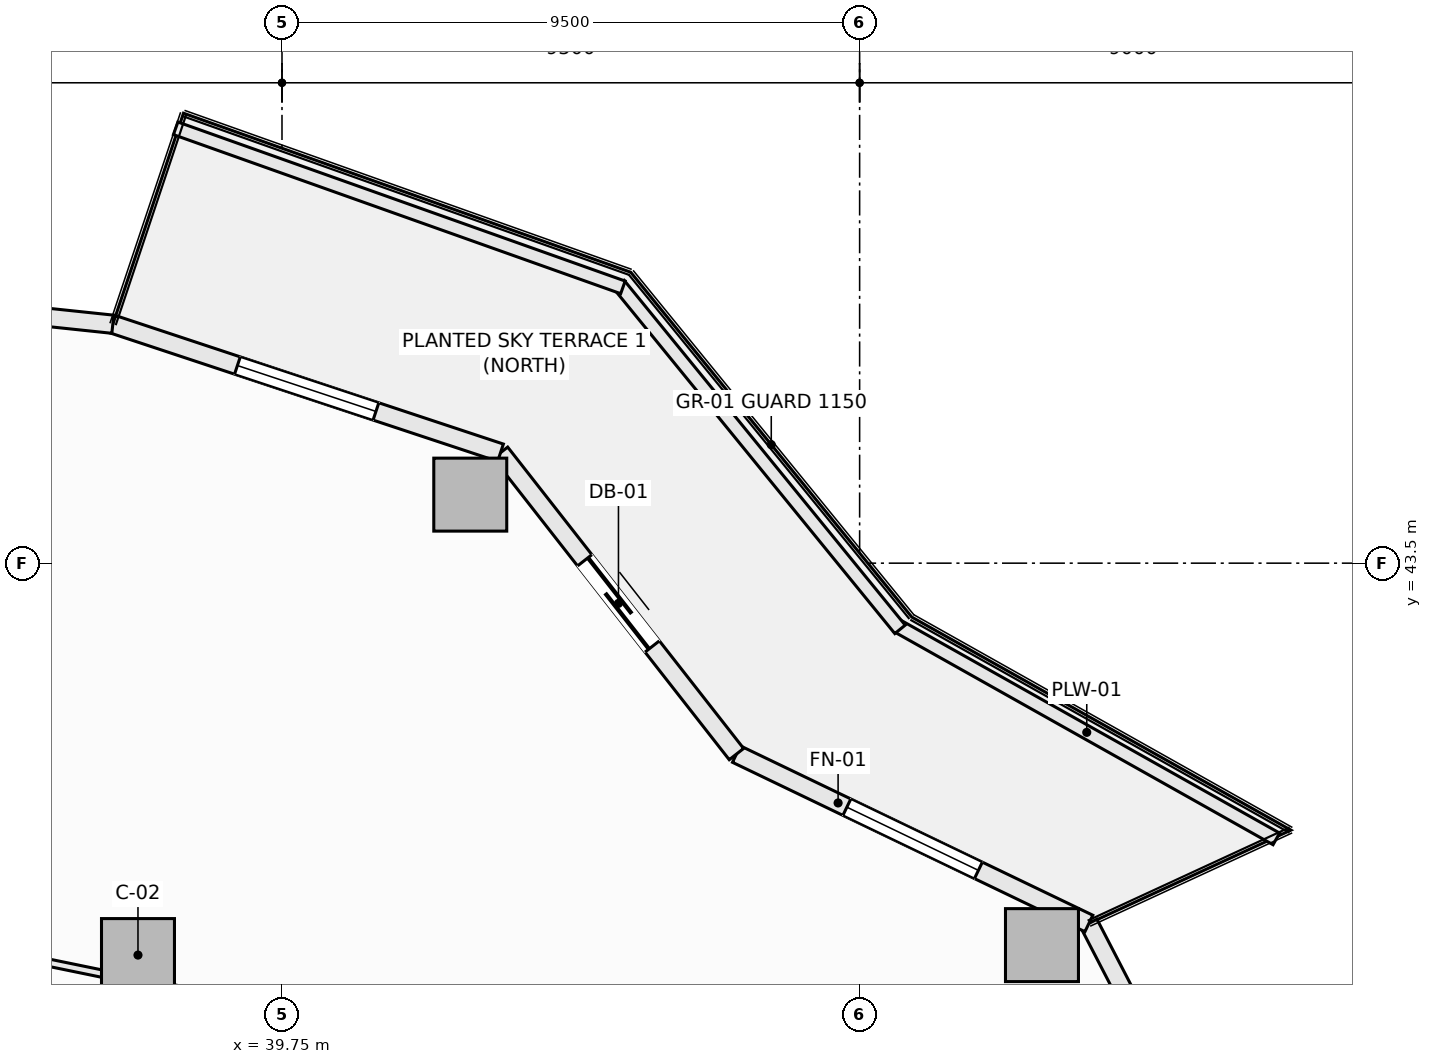
"""IFC4 building model, lengths in metres.
Left out: names, types, materials, properties, quantities, classifications, styles, units other than length and angle.
Written with IfcOpenShell. Run it as: python <this file> out.ifc"""

import sys

from ifc_helpers import new_model, si_unit, direction, frame, frame_2d, origin, origin_2d, place, context, subcontext, project, spatial, rectangle, extrude, element, fill, save


model = new_model("IFC4")
c1 = context("Model", 3, precision=1e-05, world=origin(), true_north=direction((0.0, 1.0)))
c2 = subcontext(c1, "Body", "Model", "MODEL_VIEW")
j1 = project(units=[si_unit("LENGTHUNIT", "METRE"), si_unit("PLANEANGLEUNIT", "RADIAN")], contexts=[c1])
p1 = place(None, origin())
s1 = spatial("IfcSite", under=j1, at=p1, CompositionType="ELEMENT")
p2 = place(p1, origin())
s2 = spatial("IfcBuilding", under=s1, at=p2, CompositionType="ELEMENT")
p3 = place(p2, frame((0.0, 0.0, 57.3)))
s3 = spatial("IfcBuildingStorey", under=s2, at=p3, CompositionType="ELEMENT", Elevation=57.3)
for number, where, z_axis, x_axis in (
    (1, (52.249, 37.219, -0.28), (0.0, 0.0, 1.0), (1.0, 0.0, 0.0)),
    (2, (42.846, 44.627, -0.28), (0.0, 0.0, 1.0), (1.0, 0.0, 0.0)),
    (3, (37.382, 37.055, -0.28), (0.0, 0.0, 1.0), (1.0, 0.0, 0.0)),
):
    element("IfcColumn", number, at=place(p3, frame(where, z_axis=z_axis, x_axis=x_axis)), inside=s3, PredefinedType="COLUMN", context=c2, shape_type="SweptSolid", body=[
        extrude(rectangle(XDim=1.2, YDim=1.2, at=origin_2d()), origin(), (0.0, 0.0, 1.0), 3.85),
    ])
p4 = place(p3, frame((53.021, 37.575, 0.0), z_axis=(0.0, 0.0, 1.0), x_axis=(0.459800981414, -0.888021991558, 0.0)))
e4 = element("IfcWall", 4, at=p4, inside=s3, PredefinedType="SOLIDWALL", context=c2, shape_type="SweptSolid", body=[
    extrude(rectangle(XDim=5.744, YDim=0.3, at=frame_2d((2.872, 0.0))), origin(), (0.0, 0.0, 1.0), 3.093),
])
p5 = place(p4, frame((1.672, 0.0, 0.85)))
e5 = element("IfcOpeningElement", 5, at=p5, cuts=e4, PredefinedType="OPENING", context=c2, shape_type="SweptSolid", body=[
    extrude(rectangle(XDim=2.4, YDim=1.9, at=frame_2d((1.2, 0.95))), frame((0.0, 0.16, 0.0), z_axis=(0.0, -1.0, 0.0), x_axis=(1.0, 0.0, 0.0)), (0.0, 0.0, 1.0), 0.32),
])
p6 = place(p3, frame((47.224, 40.36, 0.0), z_axis=(0.0, 0.0, 1.0), x_axis=(0.901354747727, -0.433081538224, 0.0)))
e6 = element("IfcWall", 6, at=p6, inside=s3, PredefinedType="SOLIDWALL", context=c2, shape_type="SweptSolid", body=[
    extrude(rectangle(XDim=6.431, YDim=0.3, at=frame_2d((3.215, 0.0))), origin(), (0.0, 0.0, 1.0), 3.093),
])
p7 = place(p6, frame((2.015, 0.0, 0.85)))
e7 = element("IfcOpeningElement", 7, at=p7, cuts=e6, PredefinedType="OPENING", context=c2, shape_type="SweptSolid", body=[
    extrude(rectangle(XDim=2.4, YDim=1.9, at=frame_2d((1.2, 0.95))), frame((0.0, 0.16, 0.0), z_axis=(0.0, -1.0, 0.0), x_axis=(1.0, 0.0, 0.0)), (0.0, 0.0, 1.0), 0.32),
])
p8 = place(p3, frame((43.344, 45.316, 0.0), z_axis=(0.0, 0.0, 1.0), x_axis=(0.616434798832, -0.78740595552, 0.0)))
e8 = element("IfcWall", 8, at=p8, inside=s3, PredefinedType="SOLIDWALL", context=c2, shape_type="SweptSolid", body=[
    extrude(rectangle(XDim=6.294, YDim=0.3, at=frame_2d((3.147, 0.0))), origin(), (0.0, 0.0, 1.0), 3.093),
])
p9 = place(p8, frame((2.247, 0.0, 0.0)))
e9 = element("IfcOpeningElement", 9, at=p9, cuts=e8, PredefinedType="OPENING", context=c2, shape_type="SweptSolid", body=[
    extrude(rectangle(XDim=1.8, YDim=2.25, at=frame_2d((0.9, 1.125))), frame((0.0, 0.16, 0.0), z_axis=(0.0, -1.0, 0.0), x_axis=(1.0, 0.0, 0.0)), (0.0, 0.0, 1.0), 0.32),
])
p10 = place(p3, frame((36.968, 47.429, 0.0), z_axis=(0.0, 0.0, 1.0), x_axis=(0.949245153629, -0.314537181127, 0.0)))
e10 = element("IfcWall", 10, at=p10, inside=s3, PredefinedType="SOLIDWALL", context=c2, shape_type="SweptSolid", body=[
    extrude(rectangle(XDim=6.717, YDim=0.3, at=frame_2d((3.358, 0.0))), origin(), (0.0, 0.0, 1.0), 3.093),
])
p11 = place(p10, frame((2.159, 0.0, 0.85)))
e11 = element("IfcOpeningElement", 11, at=p11, cuts=e10, PredefinedType="OPENING", context=c2, shape_type="SweptSolid", body=[
    extrude(rectangle(XDim=2.4, YDim=1.9, at=frame_2d((1.2, 0.95))), frame((0.0, 0.16, 0.0), z_axis=(0.0, -1.0, 0.0), x_axis=(1.0, 0.0, 0.0)), (0.0, 0.0, 1.0), 0.32),
])
p12 = place(p3, frame((30.125, 48.15, 0.0), z_axis=(0.0, 0.0, 1.0), x_axis=(0.994498840295, -0.104747585419, 0.0)))
e12 = element("IfcWall", 12, at=p12, inside=s3, PredefinedType="SOLIDWALL", context=c2, shape_type="SweptSolid", body=[
    extrude(rectangle(XDim=6.88, YDim=0.3, at=frame_2d((3.44, 0.0))), origin(), (0.0, 0.0, 1.0), 3.093),
])
p13 = place(p12, frame((2.24, 0.0, 0.85)))
e13 = element("IfcOpeningElement", 13, at=p13, cuts=e12, PredefinedType="OPENING", context=c2, shape_type="SweptSolid", body=[
    extrude(rectangle(XDim=2.4, YDim=1.9, at=frame_2d((1.2, 0.95))), frame((0.0, 0.16, 0.0), z_axis=(0.0, -1.0, 0.0), x_axis=(1.0, 0.0, 0.0)), (0.0, 0.0, 1.0), 0.32),
])
p14 = place(p3, frame((49.868, 42.469, 0.0), z_axis=(0.0, 0.0, 1.0), x_axis=(0.871775109335, -0.489906275468, 0.0)))
e14 = element("IfcWall", 14, at=p14, inside=s3, PredefinedType="PARAPET", context=c2, shape_type="SweptSolid", body=[
    extrude(rectangle(XDim=7.152, YDim=0.22, at=frame_2d((3.576, 0.0))), origin(), (0.0, 0.0, 1.0), 0.52),
])
p15 = place(p3, frame((45.292, 48.082, 0.0), z_axis=(0.0, 0.0, 1.0), x_axis=(0.631819273026, -0.775115737315, 0.0)))
e15 = element("IfcWall", 15, at=p15, inside=s3, PredefinedType="PARAPET", context=c2, shape_type="SweptSolid", body=[
    extrude(rectangle(XDim=7.316, YDim=0.22, at=frame_2d((3.658, 0.0))), origin(), (0.0, 0.0, 1.0), 0.52),
])
p16 = place(p3, frame((38.001, 50.651, 0.0), z_axis=(0.0, 0.0, 1.0), x_axis=(0.942203722205, -0.335040513764, 0.0)))
e16 = element("IfcWall", 16, at=p16, inside=s3, PredefinedType="PARAPET", context=c2, shape_type="SweptSolid", body=[
    extrude(rectangle(XDim=7.807, YDim=0.22, at=frame_2d((3.904, 0.0))), origin(), (0.0, 0.0, 1.0), 0.52),
])
p17 = place(p3, frame((29.842, 38.177, 0.0), z_axis=(0.0, 0.0, 1.0), x_axis=(0.979543984113, -0.201230174647, 0.0)))
e17 = element("IfcWall", 17, at=p17, inside=s3, PredefinedType="PARTITIONING", context=c2, shape_type="SweptSolid", body=[
    extrude(rectangle(XDim=16.654, YDim=0.12, at=frame_2d((8.327, 0.0))), origin(), (0.0, 0.0, 1.0), 2.934),
])
p18 = place(p7, origin())
e18 = element("IfcWindow", 18, at=p18, inside=s3, PartitioningType="SINGLE_PANEL", PredefinedType="WINDOW", context=c2, shape_type="SweptSolid", body=[
    extrude(rectangle(XDim=2.4, YDim=1.9, at=frame_2d((1.2, 0.95))), frame((0.0, 0.03, 0.0), z_axis=(0.0, -1.0, 0.0), x_axis=(1.0, 0.0, 0.0)), (0.0, 0.0, 1.0), 0.06),
])
fill(e7, e18)
p19 = place(p9, origin())
e19 = element("IfcDoor", 19, at=p19, inside=s3, OperationType="SLIDING_TO_LEFT", PredefinedType="DOOR", context=c2, shape_type="SweptSolid", body=[
    extrude(rectangle(XDim=1.8, YDim=2.25, at=frame_2d((0.9, 1.125))), frame((0.0, 0.025, 0.0), z_axis=(0.0, -1.0, 0.0), x_axis=(1.0, 0.0, 0.0)), (0.0, 0.0, 1.0), 0.05),
])
fill(e9, e19)
p20 = place(p11, origin())
e20 = element("IfcWindow", 20, at=p20, inside=s3, PartitioningType="SINGLE_PANEL", PredefinedType="WINDOW", context=c2, shape_type="SweptSolid", body=[
    extrude(rectangle(XDim=2.4, YDim=1.9, at=frame_2d((1.2, 0.95))), frame((0.0, 0.03, 0.0), z_axis=(0.0, -1.0, 0.0), x_axis=(1.0, 0.0, 0.0)), (0.0, 0.0, 1.0), 0.06),
])
fill(e11, e20)
save(model, sys.argv[1])
